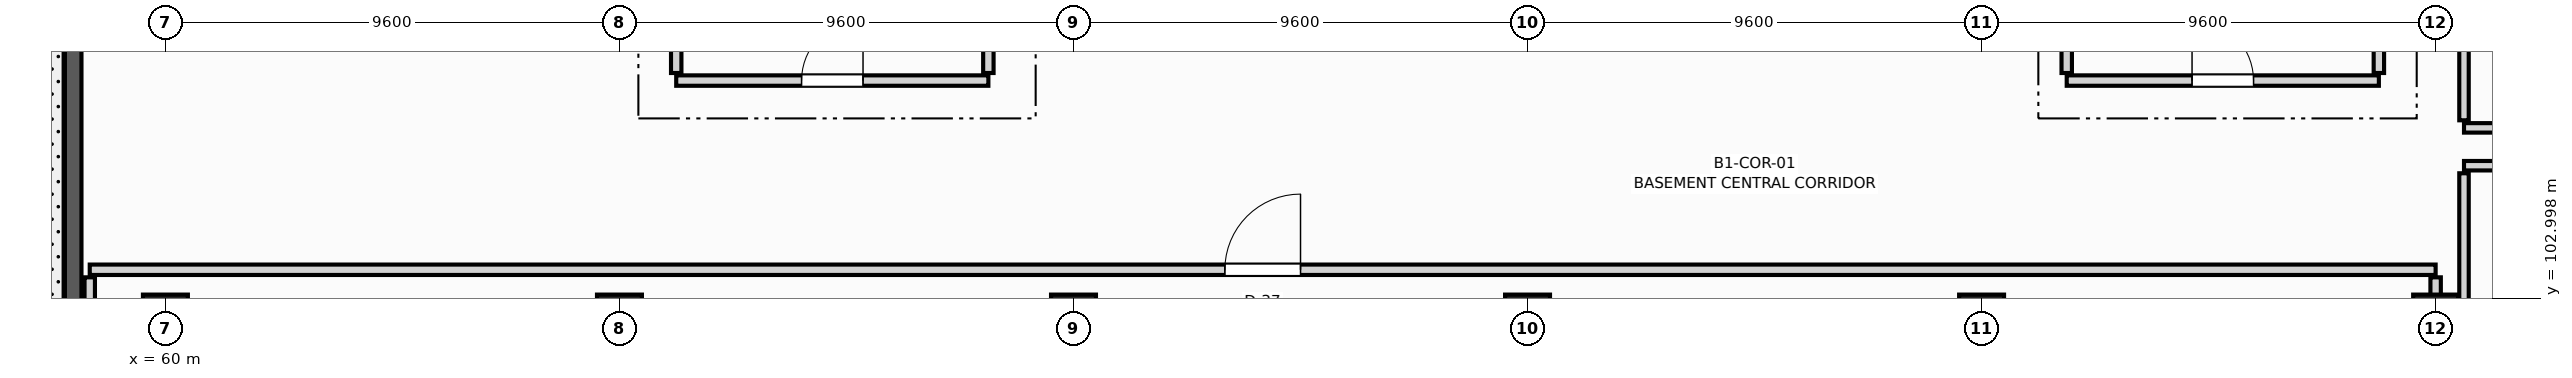
"""IFC4 building model, lengths in metres.
Left out: names, types, materials, properties, quantities, classifications, styles, units other than length and angle.
Written with IfcOpenShell. Run it as: python <this file> out.ifc"""

import sys

from ifc_helpers import new_model, si_unit, direction, frame, frame_2d, origin, origin_2d, place, context, subcontext, project, spatial, polyline, rectangle, outline, extrude, element, fill, save


model = new_model("IFC4")
c1 = context("Model", 3, precision=1e-05, world=origin(), true_north=direction((0.0, 1.0)))
c2 = subcontext(c1, "Body", "Model", "MODEL_VIEW")
j1 = project(units=[si_unit("LENGTHUNIT", "METRE"), si_unit("PLANEANGLEUNIT", "RADIAN")], contexts=[c1])
p1 = place(None, origin())
s1 = spatial("IfcSite", under=j1, at=p1, CompositionType="ELEMENT")
p2 = place(p1, origin())
s2 = spatial("IfcBuilding", under=s1, at=p2, CompositionType="ELEMENT")
p3 = place(p2, frame((0.0, 0.0, -4.5)))
s3 = spatial("IfcBuildingStorey", under=s2, at=p3, CompositionType="ELEMENT", Elevation=-4.5)
p4 = place(p3, frame((58.05, 90.0, 0.0), z_axis=(0.0, 0.0, 1.0), x_axis=(0.0, 1.0, 0.0)))
e1 = element("IfcWall", 1, at=p4, inside=s3, PredefinedType="SHEAR", context=c2, shape_type="SweptSolid", body=[
    extrude(outline(polyline([(0.0, 0.0), (27.0, 0.0), (27.0, 4.12), (0.0, 0.0), (0.0, 0.0)])), frame((0.0, 0.175, 0.0), z_axis=(0.0, -1.0, 0.0), x_axis=(1.0, 0.0, 0.0)), (0.0, 0.0, 1.0), 0.35),
])
for number, where, z_axis, x_axis in (
    (2, (60.0, 102.6, 0.0), (0.0, 0.0, 1.0), (1.0, 0.0, 0.0)),
    (3, (69.6, 102.6, 0.0), (0.0, 0.0, 1.0), (1.0, 0.0, 0.0)),
    (4, (79.2, 102.6, 0.0), (0.0, 0.0, 1.0), (1.0, 0.0, 0.0)),
    (5, (88.8, 102.6, 0.0), (0.0, 0.0, 1.0), (1.0, 0.0, 0.0)),
    (6, (98.4, 102.6, 0.0), (0.0, 0.0, 1.0), (1.0, 0.0, 0.0)),
    (7, (108.0, 102.6, 0.0), (0.0, 0.0, 1.0), (1.0, 0.0, 0.0)),
):
    element("IfcColumn", number, at=place(p3, frame(where, z_axis=z_axis, x_axis=x_axis)), inside=s3, PredefinedType="COLUMN", context=c2, shape_type="SweptSolid", body=[
        extrude(rectangle(XDim=0.95, YDim=0.95, at=origin_2d()), origin(), (0.0, 0.0, 1.0), 4.14),
    ])
p5 = place(p3, frame((70.8, 107.6, 0.0), z_axis=(0.0, 0.0, 1.0), x_axis=(1.0, 0.0, 0.0)))
e8 = element("IfcWall", 8, at=p5, inside=s3, PredefinedType="PARTITIONING", context=c2, shape_type="SweptSolid", body=[
    extrude(rectangle(XDim=6.6, YDim=0.22, at=frame_2d((3.3, 0.0))), origin(), (0.0, 0.0, 1.0), 3.22),
])
p6 = place(p5, frame((2.65, 0.0, 0.0)))
e9 = element("IfcOpeningElement", 9, at=p6, cuts=e8, PredefinedType="OPENING", context=c2, shape_type="SweptSolid", body=[
    extrude(rectangle(XDim=1.3, YDim=2.2, at=frame_2d((0.65, 1.1))), frame((0.0, 0.12, 0.0), z_axis=(0.0, -1.0, 0.0), x_axis=(1.0, 0.0, 0.0)), (0.0, 0.0, 1.0), 0.24),
])
for number, where, z_axis, x_axis in (
    (10, (70.8, 107.76, 0.0), (0.0, 0.0, 1.0), (0.0, 1.0, 0.0)),
    (11, (77.4, 107.76, 0.0), (0.0, 0.0, 1.0), (0.0, 1.0, 0.0)),
):
    element("IfcWall", number, at=place(p3, frame(where, z_axis=z_axis, x_axis=x_axis)), inside=s3, PredefinedType="PARTITIONING", context=c2, shape_type="SweptSolid", body=[
        extrude(rectangle(XDim=3.08, YDim=0.22, at=frame_2d((1.54, 0.0))), origin(), (0.0, 0.0, 1.0), 3.22),
    ])
p7 = place(p3, frame((100.2, 107.6, 0.0), z_axis=(0.0, 0.0, 1.0), x_axis=(1.0, 0.0, 0.0)))
e12 = element("IfcWall", 12, at=p7, inside=s3, PredefinedType="PARTITIONING", context=c2, shape_type="SweptSolid", body=[
    extrude(rectangle(XDim=6.6, YDim=0.22, at=frame_2d((3.3, 0.0))), origin(), (0.0, 0.0, 1.0), 3.22),
])
p8 = place(p7, frame((2.65, 0.0, 0.0)))
e13 = element("IfcOpeningElement", 13, at=p8, cuts=e12, PredefinedType="OPENING", context=c2, shape_type="SweptSolid", body=[
    extrude(rectangle(XDim=1.3, YDim=2.2, at=frame_2d((0.65, 1.1))), frame((0.0, 0.12, 0.0), z_axis=(0.0, -1.0, 0.0), x_axis=(1.0, 0.0, 0.0)), (0.0, 0.0, 1.0), 0.24),
])
for number, where, z_axis, x_axis in (
    (14, (100.2, 107.76, 0.0), (0.0, 0.0, 1.0), (0.0, 1.0, 0.0)),
    (15, (106.8, 107.76, 0.0), (0.0, 0.0, 1.0), (0.0, 1.0, 0.0)),
):
    element("IfcWall", number, at=place(p3, frame(where, z_axis=z_axis, x_axis=x_axis)), inside=s3, PredefinedType="PARTITIONING", context=c2, shape_type="SweptSolid", body=[
        extrude(rectangle(XDim=3.08, YDim=0.22, at=frame_2d((1.54, 0.0))), origin(), (0.0, 0.0, 1.0), 3.22),
    ])
p9 = place(p3, frame((108.6, 105.8, 0.0), z_axis=(0.0, 0.0, 1.0), x_axis=(1.0, 0.0, 0.0)))
e16 = element("IfcWall", 16, at=p9, inside=s3, PredefinedType="PARTITIONING", context=c2, shape_type="SweptSolid", body=[
    extrude(rectangle(XDim=17.8, YDim=0.2, at=frame_2d((8.9, 0.0))), origin(), (0.0, 0.0, 1.0), 3.22),
])
p10 = place(p3, frame((108.6, 94.56, 0.0), z_axis=(0.0, 0.0, 1.0), x_axis=(0.0, 1.0, 0.0)))
e17 = element("IfcWall", 17, at=p10, inside=s3, PredefinedType="PARTITIONING", context=c2, shape_type="SweptSolid", body=[
    extrude(rectangle(XDim=11.08, YDim=0.2, at=frame_2d((5.54, 0.0))), origin(), (0.0, 0.0, 1.0), 3.22),
])
p11 = place(p10, frame((4.99, 0.0, 0.0)))
e18 = element("IfcOpeningElement", 18, at=p11, cuts=e17, PredefinedType="OPENING", context=c2, shape_type="SweptSolid", body=[
    extrude(rectangle(XDim=1.1, YDim=2.2, at=frame_2d((0.55, 1.1))), frame((0.0, 0.11, 0.0), z_axis=(0.0, -1.0, 0.0), x_axis=(1.0, 0.0, 0.0)), (0.0, 0.0, 1.0), 0.22),
])
p12 = place(p3, frame((108.6, 106.6, 0.0), z_axis=(0.0, 0.0, 1.0), x_axis=(1.0, 0.0, 0.0)))
e19 = element("IfcWall", 19, at=p12, inside=s3, PredefinedType="PARTITIONING", context=c2, shape_type="SweptSolid", body=[
    extrude(rectangle(XDim=17.8, YDim=0.2, at=frame_2d((8.9, 0.0))), origin(), (0.0, 0.0, 1.0), 3.22),
])
p13 = place(p3, frame((108.6, 106.76, 0.0), z_axis=(0.0, 0.0, 1.0), x_axis=(0.0, 1.0, 0.0)))
e20 = element("IfcWall", 20, at=p13, inside=s3, PredefinedType="PARTITIONING", context=c2, shape_type="SweptSolid", body=[
    extrude(rectangle(XDim=11.88, YDim=0.2, at=frame_2d((5.94, 0.0))), origin(), (0.0, 0.0, 1.0), 3.22),
])
p14 = place(p13, frame((5.14, 0.0, 0.0)))
e21 = element("IfcOpeningElement", 21, at=p14, cuts=e20, PredefinedType="OPENING", context=c2, shape_type="SweptSolid", body=[
    extrude(rectangle(XDim=1.6, YDim=2.3, at=frame_2d((0.8, 1.15))), frame((0.0, 0.11, 0.0), z_axis=(0.0, -1.0, 0.0), x_axis=(1.0, 0.0, 0.0)), (0.0, 0.0, 1.0), 0.22),
])
p15 = place(p3, frame((58.4, 103.6, 0.0), z_axis=(0.0, 0.0, 1.0), x_axis=(1.0, 0.0, 0.0)))
e22 = element("IfcWall", 22, at=p15, inside=s3, PredefinedType="PARTITIONING", context=c2, shape_type="SweptSolid", body=[
    extrude(rectangle(XDim=49.6, YDim=0.22, at=frame_2d((24.8, 0.0))), origin(), (0.0, 0.0, 1.0), 3.22),
])
p16 = place(p15, frame((24.0, 0.0, 0.0)))
e23 = element("IfcOpeningElement", 23, at=p16, cuts=e22, PredefinedType="OPENING", context=c2, shape_type="SweptSolid", body=[
    extrude(rectangle(XDim=1.6, YDim=2.3, at=frame_2d((0.8, 1.15))), frame((0.0, 0.12, 0.0), z_axis=(0.0, -1.0, 0.0), x_axis=(1.0, 0.0, 0.0)), (0.0, 0.0, 1.0), 0.24),
])
for number, where, z_axis, x_axis in (
    (24, (58.4, 78.16, 0.0), (0.0, 0.0, 1.0), (0.0, 1.0, 0.0)),
    (25, (108.0, 78.16, 0.0), (0.0, 0.0, 1.0), (0.0, 1.0, 0.0)),
):
    element("IfcWall", number, at=place(p3, frame(where, z_axis=z_axis, x_axis=x_axis)), inside=s3, PredefinedType="PARTITIONING", context=c2, shape_type="SweptSolid", body=[
        extrude(rectangle(XDim=25.28, YDim=0.22, at=frame_2d((12.64, 0.0))), origin(), (0.0, 0.0, 1.0), 3.22),
    ])
p17 = place(p6, origin())
e26 = element("IfcDoor", 26, at=p17, inside=s3, OperationType="SINGLE_SWING_RIGHT", PredefinedType="DOOR", context=c2, shape_type="SweptSolid", body=[
    extrude(rectangle(XDim=1.3, YDim=2.2, at=frame_2d((0.65, 1.1))), frame((0.0, 0.025, 0.0), z_axis=(0.0, -1.0, 0.0), x_axis=(1.0, 0.0, 0.0)), (0.0, 0.0, 1.0), 0.05),
])
fill(e9, e26)
p18 = place(p8, origin())
e27 = element("IfcDoor", 27, at=p18, inside=s3, OperationType="SINGLE_SWING_LEFT", PredefinedType="DOOR", context=c2, shape_type="SweptSolid", body=[
    extrude(rectangle(XDim=1.3, YDim=2.2, at=frame_2d((0.65, 1.1))), frame((0.0, 0.025, 0.0), z_axis=(0.0, -1.0, 0.0), x_axis=(1.0, 0.0, 0.0)), (0.0, 0.0, 1.0), 0.05),
])
fill(e13, e27)
p19 = place(p16, origin())
e28 = element("IfcDoor", 28, at=p19, inside=s3, OperationType="SINGLE_SWING_RIGHT", PredefinedType="DOOR", context=c2, shape_type="SweptSolid", body=[
    extrude(rectangle(XDim=1.6, YDim=2.3, at=frame_2d((0.8, 1.15))), frame((0.0, 0.025, 0.0), z_axis=(0.0, -1.0, 0.0), x_axis=(1.0, 0.0, 0.0)), (0.0, 0.0, 1.0), 0.05),
])
fill(e23, e28)
save(model, sys.argv[1])
